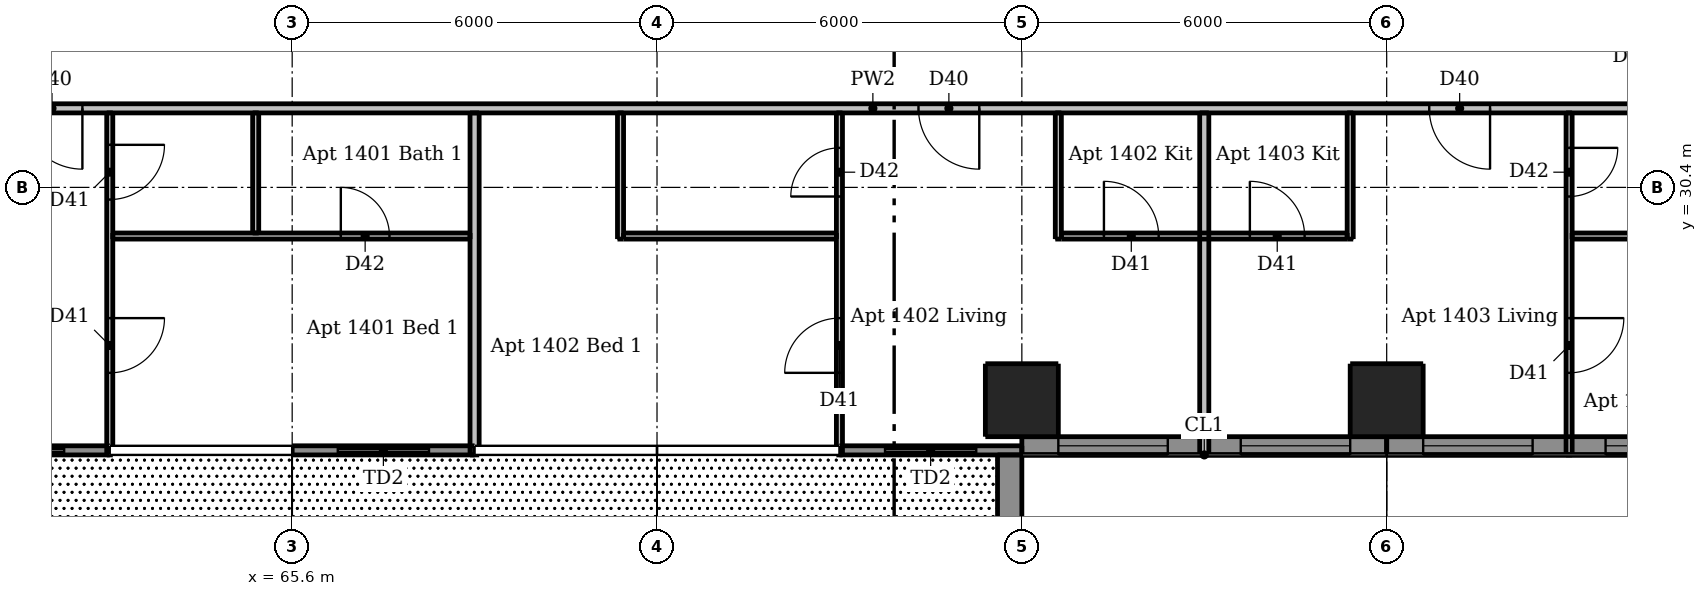
"""IFC4 building model, lengths in metres.
Left out: names, types, materials, properties, quantities, classifications, styles, units other than length and angle.
Written with IfcOpenShell. Run it as: python <this file> out.ifc"""

import sys

from ifc_helpers import new_model, si_unit, direction, frame, frame_2d, origin, origin_2d, place, context, subcontext, project, spatial, rectangle, extrude, element, fill, save


model = new_model("IFC4")
c1 = context("Model", 3, precision=1e-05, world=origin(), true_north=direction((0.0, 1.0)))
c2 = subcontext(c1, "Body", "Model", "MODEL_VIEW")
j1 = project(units=[si_unit("LENGTHUNIT", "METRE"), si_unit("PLANEANGLEUNIT", "RADIAN")], contexts=[c1])
p1 = place(None, origin())
s1 = spatial("IfcSite", under=j1, at=p1, CompositionType="ELEMENT")
p2 = place(p1, origin())
s2 = spatial("IfcBuilding", under=s1, at=p2, CompositionType="ELEMENT")
p3 = place(p2, frame((0.0, 0.0, 53.2)))
s3 = spatial("IfcBuildingStorey", under=s2, at=p3, CompositionType="ELEMENT", Elevation=53.2)
for number, where, z_axis, x_axis in (
    (1, (77.6, 26.9, 0.0), (0.0, 0.0, 1.0), (1.0, 0.0, 0.0)),
    (2, (83.6, 26.9, 0.0), (0.0, 0.0, 1.0), (1.0, 0.0, 0.0)),
):
    element("IfcColumn", number, at=place(p3, frame(where, z_axis=z_axis, x_axis=x_axis)), inside=s3, PredefinedType="COLUMN", context=c2, shape_type="SweptSolid", body=[
        extrude(rectangle(XDim=1.2, YDim=1.2, at=origin_2d()), origin(), (0.0, 0.0, 1.0), 3.05),
    ])
p4 = place(p3, frame((59.6, 26.075, 0.0), z_axis=(0.0, 0.0, 1.0), x_axis=(1.0, 0.0, 0.0)))
e3 = element("IfcWall", 3, at=p4, inside=s3, PredefinedType="SOLIDWALL", context=c2, shape_type="SweptSolid", body=[
    extrude(rectangle(XDim=3.0, YDim=0.15, at=frame_2d((1.5, 0.0))), origin(), (0.0, 0.0, 1.0), 3.05),
])
p5 = place(p4, frame((0.75, 0.0, 0.0)))
e4 = element("IfcOpeningElement", 4, at=p5, cuts=e3, PredefinedType="OPENING", context=c2, shape_type="SweptSolid", body=[
    extrude(rectangle(XDim=1.5, YDim=2.4, at=frame_2d((0.75, 1.2))), frame((0.0, 0.085, 0.0), z_axis=(0.0, -1.0, 0.0), x_axis=(1.0, 0.0, 0.0)), (0.0, 0.0, 1.0), 0.17),
])
p6 = place(p3, frame((65.6, 26.075, 0.0), z_axis=(0.0, 0.0, 1.0), x_axis=(1.0, 0.0, 0.0)))
e5 = element("IfcWall", 5, at=p6, inside=s3, PredefinedType="SOLIDWALL", context=c2, shape_type="SweptSolid", body=[
    extrude(rectangle(XDim=3.0, YDim=0.15, at=frame_2d((1.5, 0.0))), origin(), (0.0, 0.0, 1.0), 3.05),
])
p7 = place(p6, frame((0.75, 0.0, 0.0)))
e6 = element("IfcOpeningElement", 6, at=p7, cuts=e5, PredefinedType="OPENING", context=c2, shape_type="SweptSolid", body=[
    extrude(rectangle(XDim=1.5, YDim=2.4, at=frame_2d((0.75, 1.2))), frame((0.0, 0.085, 0.0), z_axis=(0.0, -1.0, 0.0), x_axis=(1.0, 0.0, 0.0)), (0.0, 0.0, 1.0), 0.17),
])
p8 = place(p3, frame((74.6, 26.075, 0.0), z_axis=(0.0, 0.0, 1.0), x_axis=(1.0, 0.0, 0.0)))
e7 = element("IfcWall", 7, at=p8, inside=s3, PredefinedType="SOLIDWALL", context=c2, shape_type="SweptSolid", body=[
    extrude(rectangle(XDim=3.0, YDim=0.15, at=frame_2d((1.5, 0.0))), origin(), (0.0, 0.0, 1.0), 3.05),
])
p9 = place(p8, frame((0.75, 0.0, 0.0)))
e8 = element("IfcOpeningElement", 8, at=p9, cuts=e7, PredefinedType="OPENING", context=c2, shape_type="SweptSolid", body=[
    extrude(rectangle(XDim=1.5, YDim=2.4, at=frame_2d((0.75, 1.2))), frame((0.0, 0.085, 0.0), z_axis=(0.0, -1.0, 0.0), x_axis=(1.0, 0.0, 0.0)), (0.0, 0.0, 1.0), 0.17),
])
p10 = place(p3, frame((77.6, 26.15, 0.0), z_axis=(0.0, 0.0, 1.0), x_axis=(1.0, 0.0, 0.0)))
e9 = element("IfcWall", 9, at=p10, inside=s3, PredefinedType="SOLIDWALL", context=c2, shape_type="SweptSolid", body=[
    extrude(rectangle(XDim=6.0, YDim=0.3, at=frame_2d((3.0, 0.0))), origin(), (0.0, 0.0, 1.0), 3.05),
])
p11 = place(p10, frame((0.6, 0.0, 0.15)))
e10 = element("IfcOpeningElement", 10, at=p11, cuts=e9, PredefinedType="OPENING", context=c2, shape_type="SweptSolid", body=[
    extrude(rectangle(XDim=1.8, YDim=2.1, at=frame_2d((0.9, 1.05))), frame((0.0, 0.16, 0.0), z_axis=(0.0, -1.0, 0.0), x_axis=(1.0, 0.0, 0.0)), (0.0, 0.0, 1.0), 0.32),
])
p12 = place(p10, frame((3.6, 0.0, 0.15)))
e11 = element("IfcOpeningElement", 11, at=p12, cuts=e9, PredefinedType="OPENING", context=c2, shape_type="SweptSolid", body=[
    extrude(rectangle(XDim=1.8, YDim=2.1, at=frame_2d((0.9, 1.05))), frame((0.0, 0.16, 0.0), z_axis=(0.0, -1.0, 0.0), x_axis=(1.0, 0.0, 0.0)), (0.0, 0.0, 1.0), 0.32),
])
p13 = place(p3, frame((83.6, 26.15, 0.0), z_axis=(0.0, 0.0, 1.0), x_axis=(1.0, 0.0, 0.0)))
e12 = element("IfcWall", 12, at=p13, inside=s3, PredefinedType="SOLIDWALL", context=c2, shape_type="SweptSolid", body=[
    extrude(rectangle(XDim=5.89, YDim=0.3, at=frame_2d((2.945, 0.0))), origin(), (0.0, 0.0, 1.0), 3.05),
])
p14 = place(p13, frame((0.6, 0.0, 0.15)))
e13 = element("IfcOpeningElement", 13, at=p14, cuts=e12, PredefinedType="OPENING", context=c2, shape_type="SweptSolid", body=[
    extrude(rectangle(XDim=1.8, YDim=2.1, at=frame_2d((0.9, 1.05))), frame((0.0, 0.16, 0.0), z_axis=(0.0, -1.0, 0.0), x_axis=(1.0, 0.0, 0.0)), (0.0, 0.0, 1.0), 0.32),
])
p15 = place(p13, frame((3.6, 0.0, 0.15)))
e14 = element("IfcOpeningElement", 14, at=p15, cuts=e12, PredefinedType="OPENING", context=c2, shape_type="SweptSolid", body=[
    extrude(rectangle(XDim=1.8, YDim=2.1, at=frame_2d((0.9, 1.05))), frame((0.0, 0.16, 0.0), z_axis=(0.0, -1.0, 0.0), x_axis=(1.0, 0.0, 0.0)), (0.0, 0.0, 1.0), 0.32),
])
p16 = place(p3, frame((77.4, 23.4, 0.03), z_axis=(0.0, 0.0, 1.0), x_axis=(0.0, 1.0, 0.0)))
e15 = element("IfcWall", 15, at=p16, inside=s3, PredefinedType="PARAPET", context=c2, shape_type="SweptSolid", body=[
    extrude(rectangle(XDim=2.6, YDim=0.4, at=frame_2d((1.3, 0.0))), origin(), (0.0, 0.0, 1.0), 1.1),
])
p17 = place(p3, frame((62.6, 31.625, 0.0), z_axis=(0.0, 0.0, 1.0), x_axis=(0.0, -1.0, 0.0)))
e16 = element("IfcWall", 16, at=p17, inside=s3, PredefinedType="PARTITIONING", context=c2, shape_type="SweptSolid", body=[
    extrude(rectangle(XDim=5.625, YDim=0.1, at=frame_2d((2.812, 0.0))), origin(), (0.0, 0.0, 1.0), 3.05),
])
p18 = place(p17, frame((0.525, 0.0, 0.0)))
e17 = element("IfcOpeningElement", 17, at=p18, cuts=e16, PredefinedType="OPENING", context=c2, shape_type="SweptSolid", body=[
    extrude(rectangle(XDim=0.9, YDim=2.1, at=frame_2d((0.45, 1.05))), frame((0.0, 0.06, 0.0), z_axis=(0.0, -1.0, 0.0), x_axis=(1.0, 0.0, 0.0)), (0.0, 0.0, 1.0), 0.12),
])
p19 = place(p17, frame((3.375, 0.0, 0.0)))
e18 = element("IfcOpeningElement", 18, at=p19, cuts=e16, PredefinedType="OPENING", context=c2, shape_type="SweptSolid", body=[
    extrude(rectangle(XDim=0.9, YDim=2.1, at=frame_2d((0.45, 1.05))), frame((0.0, 0.06, 0.0), z_axis=(0.0, -1.0, 0.0), x_axis=(1.0, 0.0, 0.0)), (0.0, 0.0, 1.0), 0.12),
])
p20 = place(p3, frame((65.0, 29.65, 0.0), z_axis=(0.0, 0.0, 1.0), x_axis=(0.0, 1.0, 0.0)))
e19 = element("IfcWall", 19, at=p20, inside=s3, PredefinedType="PARTITIONING", context=c2, shape_type="SweptSolid", body=[
    extrude(rectangle(XDim=1.975, YDim=0.1, at=frame_2d((0.988, 0.0))), origin(), (0.0, 0.0, 1.0), 3.05),
])
p21 = place(p3, frame((71.0, 29.55, 0.0), z_axis=(0.0, 0.0, 1.0), x_axis=(0.0, 1.0, 0.0)))
e20 = element("IfcWall", 20, at=p21, inside=s3, PredefinedType="PARTITIONING", context=c2, shape_type="SweptSolid", body=[
    extrude(rectangle(XDim=2.075, YDim=0.1, at=frame_2d((1.038, 0.0))), origin(), (0.0, 0.0, 1.0), 3.05),
])
p22 = place(p3, frame((74.6, 26.0, 0.0), z_axis=(0.0, 0.0, 1.0), x_axis=(0.0, 1.0, 0.0)))
e21 = element("IfcWall", 21, at=p22, inside=s3, PredefinedType="PARTITIONING", context=c2, shape_type="SweptSolid", body=[
    extrude(rectangle(XDim=5.625, YDim=0.1, at=frame_2d((2.812, 0.0))), origin(), (0.0, 0.0, 1.0), 3.05),
])
p23 = place(p22, frame((1.35, 0.0, 0.0)))
e22 = element("IfcOpeningElement", 22, at=p23, cuts=e21, PredefinedType="OPENING", context=c2, shape_type="SweptSolid", body=[
    extrude(rectangle(XDim=0.9, YDim=2.1, at=frame_2d((0.45, 1.05))), frame((0.0, 0.06, 0.0), z_axis=(0.0, -1.0, 0.0), x_axis=(1.0, 0.0, 0.0)), (0.0, 0.0, 1.0), 0.12),
])
p24 = place(p22, frame((4.25, 0.0, 0.0)))
e23 = element("IfcOpeningElement", 23, at=p24, cuts=e21, PredefinedType="OPENING", context=c2, shape_type="SweptSolid", body=[
    extrude(rectangle(XDim=0.8, YDim=2.1, at=frame_2d((0.4, 1.05))), frame((0.0, 0.06, 0.0), z_axis=(0.0, -1.0, 0.0), x_axis=(1.0, 0.0, 0.0)), (0.0, 0.0, 1.0), 0.12),
])
for number, where, z_axis, x_axis in (
    (24, (78.2, 29.55, 0.0), (0.0, 0.0, 1.0), (0.0, 1.0, 0.0)),
    (25, (83.0, 29.55, 0.0), (0.0, 0.0, 1.0), (0.0, 1.0, 0.0)),
):
    element("IfcWall", number, at=place(p3, frame(where, z_axis=z_axis, x_axis=x_axis)), inside=s3, PredefinedType="PARTITIONING", context=c2, shape_type="SweptSolid", body=[
        extrude(rectangle(XDim=2.075, YDim=0.1, at=frame_2d((1.038, 0.0))), origin(), (0.0, 0.0, 1.0), 3.05),
    ])
p25 = place(p3, frame((86.6, 31.625, 0.0), z_axis=(0.0, 0.0, 1.0), x_axis=(0.0, -1.0, 0.0)))
e26 = element("IfcWall", 26, at=p25, inside=s3, PredefinedType="PARTITIONING", context=c2, shape_type="SweptSolid", body=[
    extrude(rectangle(XDim=5.625, YDim=0.1, at=frame_2d((2.812, 0.0))), origin(), (0.0, 0.0, 1.0), 3.05),
])
p26 = place(p25, frame((3.375, 0.0, 0.0)))
e27 = element("IfcOpeningElement", 27, at=p26, cuts=e26, PredefinedType="OPENING", context=c2, shape_type="SweptSolid", body=[
    extrude(rectangle(XDim=0.9, YDim=2.1, at=frame_2d((0.45, 1.05))), frame((0.0, 0.06, 0.0), z_axis=(0.0, -1.0, 0.0), x_axis=(1.0, 0.0, 0.0)), (0.0, 0.0, 1.0), 0.12),
])
p27 = place(p25, frame((0.575, 0.0, 0.0)))
e28 = element("IfcOpeningElement", 28, at=p27, cuts=e26, PredefinedType="OPENING", context=c2, shape_type="SweptSolid", body=[
    extrude(rectangle(XDim=0.8, YDim=2.1, at=frame_2d((0.4, 1.05))), frame((0.0, 0.06, 0.0), z_axis=(0.0, -1.0, 0.0), x_axis=(1.0, 0.0, 0.0)), (0.0, 0.0, 1.0), 0.12),
])
p28 = place(p3, frame((62.65, 29.6, 0.0), z_axis=(0.0, 0.0, 1.0), x_axis=(1.0, 0.0, 0.0)))
e29 = element("IfcWall", 29, at=p28, inside=s3, PredefinedType="PARTITIONING", context=c2, shape_type="SweptSolid", body=[
    extrude(rectangle(XDim=5.875, YDim=0.1, at=frame_2d((2.938, 0.0))), origin(), (0.0, 0.0, 1.0), 3.05),
])
p29 = place(p28, frame((3.75, 0.0, 0.0)))
e30 = element("IfcOpeningElement", 30, at=p29, cuts=e29, PredefinedType="OPENING", context=c2, shape_type="SweptSolid", body=[
    extrude(rectangle(XDim=0.8, YDim=2.1, at=frame_2d((0.4, 1.05))), frame((0.0, 0.06, 0.0), z_axis=(0.0, -1.0, 0.0), x_axis=(1.0, 0.0, 0.0)), (0.0, 0.0, 1.0), 0.12),
])
p30 = place(p3, frame((71.05, 29.6, 0.0), z_axis=(0.0, 0.0, 1.0), x_axis=(1.0, 0.0, 0.0)))
e31 = element("IfcWall", 31, at=p30, inside=s3, PredefinedType="PARTITIONING", context=c2, shape_type="SweptSolid", body=[
    extrude(rectangle(XDim=3.5, YDim=0.1, at=frame_2d((1.75, 0.0))), origin(), (0.0, 0.0, 1.0), 3.05),
])
p31 = place(p3, frame((78.25, 29.6, 0.0), z_axis=(0.0, 0.0, 1.0), x_axis=(1.0, 0.0, 0.0)))
e32 = element("IfcWall", 32, at=p31, inside=s3, PredefinedType="PARTITIONING", context=c2, shape_type="SweptSolid", body=[
    extrude(rectangle(XDim=4.7, YDim=0.1, at=frame_2d((2.35, 0.0))), origin(), (0.0, 0.0, 1.0), 3.05),
])
p32 = place(p31, frame((0.7, 0.0, 0.0)))
e33 = element("IfcOpeningElement", 33, at=p32, cuts=e32, PredefinedType="OPENING", context=c2, shape_type="SweptSolid", body=[
    extrude(rectangle(XDim=0.9, YDim=2.1, at=frame_2d((0.45, 1.05))), frame((0.0, 0.06, 0.0), z_axis=(0.0, -1.0, 0.0), x_axis=(1.0, 0.0, 0.0)), (0.0, 0.0, 1.0), 0.12),
])
p33 = place(p31, frame((3.1, 0.0, 0.0)))
e34 = element("IfcOpeningElement", 34, at=p33, cuts=e32, PredefinedType="OPENING", context=c2, shape_type="SweptSolid", body=[
    extrude(rectangle(XDim=0.9, YDim=2.1, at=frame_2d((0.45, 1.05))), frame((0.0, 0.06, 0.0), z_axis=(0.0, -1.0, 0.0), x_axis=(1.0, 0.0, 0.0)), (0.0, 0.0, 1.0), 0.12),
])
p34 = place(p3, frame((86.65, 29.6, 0.0), z_axis=(0.0, 0.0, 1.0), x_axis=(1.0, 0.0, 0.0)))
e35 = element("IfcWall", 35, at=p34, inside=s3, PredefinedType="PARTITIONING", context=c2, shape_type="SweptSolid", body=[
    extrude(rectangle(XDim=2.875, YDim=0.1, at=frame_2d((1.438, 0.0))), origin(), (0.0, 0.0, 1.0), 3.05),
])
for number, where, z_axis, x_axis in (
    (36, (68.6, 26.0, 0.0), (0.0, 0.0, 1.0), (0.0, 1.0, 0.0)),
    (37, (80.6, 26.0, 0.0), (0.0, 0.0, 1.0), (0.0, 1.0, 0.0)),
):
    element("IfcWall", number, at=place(p3, frame(where, z_axis=z_axis, x_axis=x_axis)), inside=s3, PredefinedType="PARTITIONING", context=c2, shape_type="SweptSolid", body=[
        extrude(rectangle(XDim=5.625, YDim=0.15, at=frame_2d((2.812, 0.0))), origin(), (0.0, 0.0, 1.0), 3.05),
    ])
p35 = place(p3, frame((89.525, 31.7, 0.0), z_axis=(0.0, 0.0, 1.0), x_axis=(-1.0, 0.0, 0.0)))
e38 = element("IfcWall", 38, at=p35, inside=s3, PredefinedType="PARTITIONING", context=c2, shape_type="SweptSolid", body=[
    extrude(rectangle(XDim=28.75, YDim=0.15, at=frame_2d((14.375, 0.0))), origin(), (0.0, 0.0, 1.0), 3.05),
])
p36 = place(p35, frame((27.375, 0.0, 0.0)))
e39 = element("IfcOpeningElement", 39, at=p36, cuts=e38, PredefinedType="OPENING", context=c2, shape_type="SweptSolid", body=[
    extrude(rectangle(XDim=1.0, YDim=2.1, at=frame_2d((0.5, 1.05))), frame((0.0, 0.085, 0.0), z_axis=(0.0, -1.0, 0.0), x_axis=(1.0, 0.0, 0.0)), (0.0, 0.0, 1.0), 0.17),
])
p37 = place(p35, frame((12.625, 0.0, 0.0)))
e40 = element("IfcOpeningElement", 40, at=p37, cuts=e38, PredefinedType="OPENING", context=c2, shape_type="SweptSolid", body=[
    extrude(rectangle(XDim=1.0, YDim=2.1, at=frame_2d((0.5, 1.05))), frame((0.0, 0.085, 0.0), z_axis=(0.0, -1.0, 0.0), x_axis=(1.0, 0.0, 0.0)), (0.0, 0.0, 1.0), 0.17),
])
p38 = place(p35, frame((4.225, 0.0, 0.0)))
e41 = element("IfcOpeningElement", 41, at=p38, cuts=e38, PredefinedType="OPENING", context=c2, shape_type="SweptSolid", body=[
    extrude(rectangle(XDim=1.0, YDim=2.1, at=frame_2d((0.5, 1.05))), frame((0.0, 0.085, 0.0), z_axis=(0.0, -1.0, 0.0), x_axis=(1.0, 0.0, 0.0)), (0.0, 0.0, 1.0), 0.17),
])
p39 = place(p5, origin())
e42 = element("IfcDoor", 42, at=p39, inside=s3, OperationType="DOUBLE_DOOR_SLIDING", PredefinedType="DOOR", context=c2, shape_type="SweptSolid", body=[
    extrude(rectangle(XDim=1.5, YDim=2.4, at=frame_2d((0.75, 1.2))), frame((0.0, 0.025, 0.0), z_axis=(0.0, -1.0, 0.0), x_axis=(1.0, 0.0, 0.0)), (0.0, 0.0, 1.0), 0.05),
])
fill(e4, e42)
p40 = place(p7, origin())
e43 = element("IfcDoor", 43, at=p40, inside=s3, OperationType="DOUBLE_DOOR_SLIDING", PredefinedType="DOOR", context=c2, shape_type="SweptSolid", body=[
    extrude(rectangle(XDim=1.5, YDim=2.4, at=frame_2d((0.75, 1.2))), frame((0.0, 0.025, 0.0), z_axis=(0.0, -1.0, 0.0), x_axis=(1.0, 0.0, 0.0)), (0.0, 0.0, 1.0), 0.05),
])
fill(e6, e43)
p41 = place(p9, origin())
e44 = element("IfcDoor", 44, at=p41, inside=s3, OperationType="DOUBLE_DOOR_SLIDING", PredefinedType="DOOR", context=c2, shape_type="SweptSolid", body=[
    extrude(rectangle(XDim=1.5, YDim=2.4, at=frame_2d((0.75, 1.2))), frame((0.0, 0.025, 0.0), z_axis=(0.0, -1.0, 0.0), x_axis=(1.0, 0.0, 0.0)), (0.0, 0.0, 1.0), 0.05),
])
fill(e8, e44)
p42 = place(p11, origin())
e45 = element("IfcWindow", 45, at=p42, inside=s3, PartitioningType="DOUBLE_PANEL_VERTICAL", PredefinedType="WINDOW", context=c2, shape_type="SweptSolid", body=[
    extrude(rectangle(XDim=1.8, YDim=2.1, at=frame_2d((0.9, 1.05))), frame((0.0, 0.03, 0.0), z_axis=(0.0, -1.0, 0.0), x_axis=(1.0, 0.0, 0.0)), (0.0, 0.0, 1.0), 0.06),
])
fill(e10, e45)
p43 = place(p12, origin())
e46 = element("IfcWindow", 46, at=p43, inside=s3, PartitioningType="DOUBLE_PANEL_VERTICAL", PredefinedType="WINDOW", context=c2, shape_type="SweptSolid", body=[
    extrude(rectangle(XDim=1.8, YDim=2.1, at=frame_2d((0.9, 1.05))), frame((0.0, 0.03, 0.0), z_axis=(0.0, -1.0, 0.0), x_axis=(1.0, 0.0, 0.0)), (0.0, 0.0, 1.0), 0.06),
])
fill(e11, e46)
p44 = place(p14, origin())
e47 = element("IfcWindow", 47, at=p44, inside=s3, PartitioningType="DOUBLE_PANEL_VERTICAL", PredefinedType="WINDOW", context=c2, shape_type="SweptSolid", body=[
    extrude(rectangle(XDim=1.8, YDim=2.1, at=frame_2d((0.9, 1.05))), frame((0.0, 0.03, 0.0), z_axis=(0.0, -1.0, 0.0), x_axis=(1.0, 0.0, 0.0)), (0.0, 0.0, 1.0), 0.06),
])
fill(e13, e47)
p45 = place(p15, origin())
e48 = element("IfcWindow", 48, at=p45, inside=s3, PartitioningType="DOUBLE_PANEL_VERTICAL", PredefinedType="WINDOW", context=c2, shape_type="SweptSolid", body=[
    extrude(rectangle(XDim=1.8, YDim=2.1, at=frame_2d((0.9, 1.05))), frame((0.0, 0.03, 0.0), z_axis=(0.0, -1.0, 0.0), x_axis=(1.0, 0.0, 0.0)), (0.0, 0.0, 1.0), 0.06),
])
fill(e14, e48)
p46 = place(p36, origin())
e49 = element("IfcDoor", 49, at=p46, inside=s3, OperationType="SINGLE_SWING_LEFT", PredefinedType="DOOR", context=c2, shape_type="SweptSolid", body=[
    extrude(rectangle(XDim=1.0, YDim=2.1, at=frame_2d((0.5, 1.05))), frame((0.0, 0.025, 0.0), z_axis=(0.0, -1.0, 0.0), x_axis=(1.0, 0.0, 0.0)), (0.0, 0.0, 1.0), 0.05),
])
fill(e39, e49)
p47 = place(p18, origin())
e50 = element("IfcDoor", 50, at=p47, inside=s3, OperationType="SINGLE_SWING_LEFT", PredefinedType="DOOR", context=c2, shape_type="SweptSolid", body=[
    extrude(rectangle(XDim=0.9, YDim=2.1, at=frame_2d((0.45, 1.05))), frame((0.0, 0.025, 0.0), z_axis=(0.0, -1.0, 0.0), x_axis=(1.0, 0.0, 0.0)), (0.0, 0.0, 1.0), 0.05),
])
fill(e17, e50)
p48 = place(p19, origin())
e51 = element("IfcDoor", 51, at=p48, inside=s3, OperationType="SINGLE_SWING_LEFT", PredefinedType="DOOR", context=c2, shape_type="SweptSolid", body=[
    extrude(rectangle(XDim=0.9, YDim=2.1, at=frame_2d((0.45, 1.05))), frame((0.0, 0.025, 0.0), z_axis=(0.0, -1.0, 0.0), x_axis=(1.0, 0.0, 0.0)), (0.0, 0.0, 1.0), 0.05),
])
fill(e18, e51)
p49 = place(p29, origin())
e52 = element("IfcDoor", 52, at=p49, inside=s3, OperationType="SINGLE_SWING_LEFT", PredefinedType="DOOR", context=c2, shape_type="SweptSolid", body=[
    extrude(rectangle(XDim=0.8, YDim=2.1, at=frame_2d((0.4, 1.05))), frame((0.0, 0.025, 0.0), z_axis=(0.0, -1.0, 0.0), x_axis=(1.0, 0.0, 0.0)), (0.0, 0.0, 1.0), 0.05),
])
fill(e30, e52)
p50 = place(p37, origin())
e53 = element("IfcDoor", 53, at=p50, inside=s3, OperationType="SINGLE_SWING_LEFT", PredefinedType="DOOR", context=c2, shape_type="SweptSolid", body=[
    extrude(rectangle(XDim=1.0, YDim=2.1, at=frame_2d((0.5, 1.05))), frame((0.0, 0.025, 0.0), z_axis=(0.0, -1.0, 0.0), x_axis=(1.0, 0.0, 0.0)), (0.0, 0.0, 1.0), 0.05),
])
fill(e40, e53)
p51 = place(p32, origin())
e54 = element("IfcDoor", 54, at=p51, inside=s3, OperationType="SINGLE_SWING_LEFT", PredefinedType="DOOR", context=c2, shape_type="SweptSolid", body=[
    extrude(rectangle(XDim=0.9, YDim=2.1, at=frame_2d((0.45, 1.05))), frame((0.0, 0.025, 0.0), z_axis=(0.0, -1.0, 0.0), x_axis=(1.0, 0.0, 0.0)), (0.0, 0.0, 1.0), 0.05),
])
fill(e33, e54)
p52 = place(p23, origin())
e55 = element("IfcDoor", 55, at=p52, inside=s3, OperationType="SINGLE_SWING_LEFT", PredefinedType="DOOR", context=c2, shape_type="SweptSolid", body=[
    extrude(rectangle(XDim=0.9, YDim=2.1, at=frame_2d((0.45, 1.05))), frame((0.0, 0.025, 0.0), z_axis=(0.0, -1.0, 0.0), x_axis=(1.0, 0.0, 0.0)), (0.0, 0.0, 1.0), 0.05),
])
fill(e22, e55)
p53 = place(p24, origin())
e56 = element("IfcDoor", 56, at=p53, inside=s3, OperationType="SINGLE_SWING_LEFT", PredefinedType="DOOR", context=c2, shape_type="SweptSolid", body=[
    extrude(rectangle(XDim=0.8, YDim=2.1, at=frame_2d((0.4, 1.05))), frame((0.0, 0.025, 0.0), z_axis=(0.0, -1.0, 0.0), x_axis=(1.0, 0.0, 0.0)), (0.0, 0.0, 1.0), 0.05),
])
fill(e23, e56)
p54 = place(p38, origin())
e57 = element("IfcDoor", 57, at=p54, inside=s3, OperationType="SINGLE_SWING_LEFT", PredefinedType="DOOR", context=c2, shape_type="SweptSolid", body=[
    extrude(rectangle(XDim=1.0, YDim=2.1, at=frame_2d((0.5, 1.05))), frame((0.0, 0.025, 0.0), z_axis=(0.0, -1.0, 0.0), x_axis=(1.0, 0.0, 0.0)), (0.0, 0.0, 1.0), 0.05),
])
fill(e41, e57)
p55 = place(p33, origin())
e58 = element("IfcDoor", 58, at=p55, inside=s3, OperationType="SINGLE_SWING_LEFT", PredefinedType="DOOR", context=c2, shape_type="SweptSolid", body=[
    extrude(rectangle(XDim=0.9, YDim=2.1, at=frame_2d((0.45, 1.05))), frame((0.0, 0.025, 0.0), z_axis=(0.0, -1.0, 0.0), x_axis=(1.0, 0.0, 0.0)), (0.0, 0.0, 1.0), 0.05),
])
fill(e34, e58)
p56 = place(p26, origin())
e59 = element("IfcDoor", 59, at=p56, inside=s3, OperationType="SINGLE_SWING_LEFT", PredefinedType="DOOR", context=c2, shape_type="SweptSolid", body=[
    extrude(rectangle(XDim=0.9, YDim=2.1, at=frame_2d((0.45, 1.05))), frame((0.0, 0.025, 0.0), z_axis=(0.0, -1.0, 0.0), x_axis=(1.0, 0.0, 0.0)), (0.0, 0.0, 1.0), 0.05),
])
fill(e27, e59)
p57 = place(p27, origin())
e60 = element("IfcDoor", 60, at=p57, inside=s3, OperationType="SINGLE_SWING_LEFT", PredefinedType="DOOR", context=c2, shape_type="SweptSolid", body=[
    extrude(rectangle(XDim=0.8, YDim=2.1, at=frame_2d((0.4, 1.05))), frame((0.0, 0.025, 0.0), z_axis=(0.0, -1.0, 0.0), x_axis=(1.0, 0.0, 0.0)), (0.0, 0.0, 1.0), 0.05),
])
fill(e28, e60)
save(model, sys.argv[1])
